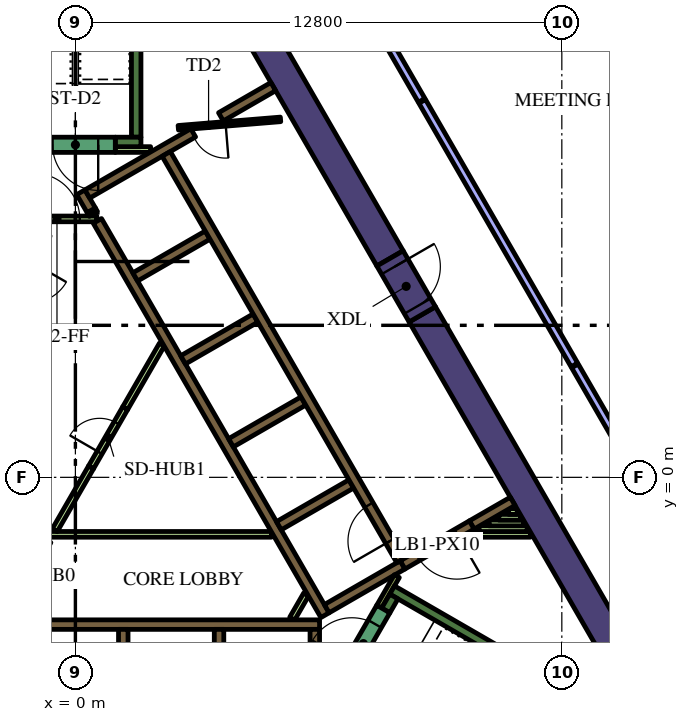
"""IFC4 building model, lengths in metres.
Left out: names, types, materials, properties, quantities, classifications, styles, units other than length and angle.
Written with IfcOpenShell. Run it as: python <this file> out.ifc"""

import sys

from ifc_helpers import new_model, si_unit, direction, frame, frame_2d, origin, place, context, subcontext, project, spatial, rectangle, extrude, element, fill, save


model = new_model("IFC4")
c1 = context("Model", 3, precision=1e-05, world=origin(), true_north=direction((0.0, 1.0)))
c2 = subcontext(c1, "Body", "Model", "MODEL_VIEW")
j1 = project(units=[si_unit("LENGTHUNIT", "METRE"), si_unit("PLANEANGLEUNIT", "RADIAN")], contexts=[c1])
p1 = place(None, origin())
s1 = spatial("IfcSite", under=j1, at=p1, CompositionType="ELEMENT")
p2 = place(p1, origin())
s2 = spatial("IfcBuilding", under=s1, at=p2, CompositionType="ELEMENT")
p3 = place(p2, frame((0.0, 0.0, 171.0)))
s3 = spatial("IfcBuildingStorey", under=s2, at=p3, CompositionType="ELEMENT", Elevation=171.0)
p4 = place(p3, frame((9.129, 4.289, 0.0), z_axis=(0.0, 0.0, 1.0), x_axis=(0.499995742806, -0.866027861663, 0.0)))
e1 = element("IfcWall", 1, at=p4, inside=s3, PredefinedType="SOLIDWALL", context=c2, shape_type="SweptSolid", body=[
    extrude(rectangle(XDim=12.527, YDim=0.8, at=frame_2d((6.264, 0.0))), origin(), (0.0, 0.0, 1.0), 4.2),
])
p5 = place(p3, frame((8.279, 5.761, 0.0), z_axis=(0.0, 0.0, 1.0), x_axis=(-0.500010359015, 0.866019422922, 0.0)))
e2 = element("IfcWall", 2, at=p5, inside=s3, PredefinedType="SOLIDWALL", context=c2, shape_type="SweptSolid", body=[
    extrude(rectangle(XDim=12.528, YDim=0.8, at=frame_2d((6.264, 0.0))), origin(), (0.0, 0.0, 1.0), 4.2),
])
p6 = place(p3, frame((8.334, -2.964, 0.0), z_axis=(0.0, 0.0, 1.0), x_axis=(0.866016039709, -0.500016218704, 0.0)))
e3 = element("IfcWall", 3, at=p6, inside=s3, PredefinedType="SOLIDWALL", context=c2, shape_type="SweptSolid", body=[
    extrude(rectangle(XDim=7.05, YDim=0.25, at=frame_2d((3.525, 0.0))), origin(), (0.0, 0.0, 1.0), 4.2),
])
p7 = place(p3, frame((8.168, -3.503, 0.0), z_axis=(0.0, 0.0, 1.0), x_axis=(0.49972245349, 0.866185586049, 0.0)))
e4 = element("IfcWall", 4, at=p7, inside=s3, PredefinedType="SOLIDWALL", context=c2, shape_type="SweptSolid", body=[
    extrude(rectangle(XDim=0.425, YDim=0.25, at=frame_2d((0.212, 0.0))), origin(), (0.0, 0.0, 1.0), 4.2),
])
p8 = place(p3, frame((1.6, 8.95, 0.0), z_axis=(0.0, 0.0, 1.0), x_axis=(0.0, 1.0, 0.0)))
e5 = element("IfcWall", 5, at=p8, inside=s3, PredefinedType="SOLIDWALL", context=c2, shape_type="SweptSolid", body=[
    extrude(rectangle(XDim=6.8, YDim=0.25, at=frame_2d((3.4, 0.0))), origin(), (0.0, 0.0, 1.0), 4.2),
])
p9 = place(p3, frame((1.05, 8.825, 0.0), z_axis=(0.0, 0.0, 1.0), x_axis=(1.0, 0.0, 0.0)))
e6 = element("IfcWall", 6, at=p9, inside=s3, PredefinedType="SOLIDWALL", context=c2, shape_type="SweptSolid", body=[
    extrude(rectangle(XDim=0.675, YDim=0.25, at=frame_2d((0.337, 0.0))), origin(), (0.0, 0.0, 1.0), 4.2),
])
p10 = place(p3, frame((-5.545, -3.875, 0.0), z_axis=(0.0, 0.0, 1.0), x_axis=(1.0, 0.0, 0.0)))
e7 = element("IfcWall", 7, at=p10, inside=s3, PredefinedType="SOLIDWALL", context=c2, shape_type="SweptSolid", body=[
    extrude(rectangle(XDim=11.97, YDim=0.25, at=frame_2d((5.985, 0.0))), origin(), (0.0, 0.0, 1.0), 4.2),
])
p11 = place(p3, frame((6.3, -7.24, 0.0), z_axis=(0.0, 0.0, 1.0), x_axis=(0.0, 1.0, 0.0)))
e8 = element("IfcWall", 8, at=p11, inside=s3, PredefinedType="SOLIDWALL", context=c2, shape_type="SweptSolid", body=[
    extrude(rectangle(XDim=3.24, YDim=0.25, at=frame_2d((1.62, 0.0))), origin(), (0.0, 0.0, 1.0), 4.2),
])
for number, where, z_axis, x_axis in (
    (9, (3.78, -4.0, 0.0), (0.0, 0.0, 1.0), (0.0, -1.0, 0.0)),
    (10, (1.26, -4.0, 0.0), (0.0, 0.0, 1.0), (0.0, -1.0, 0.0)),
):
    element("IfcWall", number, at=place(p3, frame(where, z_axis=z_axis, x_axis=x_axis)), inside=s3, PredefinedType="SOLIDWALL", context=c2, shape_type="SweptSolid", body=[
        extrude(rectangle(XDim=2.2, YDim=0.25, at=frame_2d((1.1, 0.0))), origin(), (0.0, 0.0, 1.0), 4.2),
    ])
p12 = place(p3, frame((11.507, -0.631, 0.0), z_axis=(0.0, 0.0, 1.0), x_axis=(-0.866025525965, -0.499999788377, 0.0)))
e11 = element("IfcWall", 11, at=p12, inside=s3, PredefinedType="SOLIDWALL", context=c2, shape_type="SweptSolid", body=[
    extrude(rectangle(XDim=1.245, YDim=0.25, at=frame_2d((0.622, 0.0))), origin(), (0.0, 0.0, 1.0), 4.2),
])
p13 = place(p3, frame((0.473, 6.93, 0.0), z_axis=(0.0, 0.0, 1.0), x_axis=(-0.49972245349, 0.866185586049, 0.0)))
e12 = element("IfcWall", 12, at=p13, inside=s3, PredefinedType="SOLIDWALL", context=c2, shape_type="SweptSolid", body=[
    extrude(rectangle(XDim=0.11, YDim=0.25, at=frame_2d((0.055, 0.0))), origin(), (0.0, 0.0, 1.0), 4.2),
])
p14 = place(p3, frame((6.568, -3.627, 0.0), z_axis=(0.0, 0.0, 1.0), x_axis=(-0.499999455981, 0.866025717874, 0.0)))
e13 = element("IfcWall", 13, at=p14, inside=s3, PredefinedType="SOLIDWALL", context=c2, shape_type="SweptSolid", body=[
    extrude(rectangle(XDim=11.978, YDim=0.25, at=frame_2d((5.989, 0.0))), origin(), (0.0, 0.0, 1.0), 4.2),
])
p15 = place(p3, frame((0.417, 7.027, 0.0), z_axis=(0.0, 0.0, 1.0), x_axis=(-0.500210807569, 0.865903659763, 0.0)))
e14 = element("IfcWall", 14, at=p15, inside=s3, PredefinedType="SOLIDWALL", context=c2, shape_type="SweptSolid", body=[
    extrude(rectangle(XDim=0.548, YDim=0.25, at=frame_2d((0.274, 0.0))), origin(), (0.0, 0.0, 1.0), 4.2),
])
p16 = place(p3, frame((3.1, 9.064, 0.0), z_axis=(0.0, 0.0, 1.0), x_axis=(-0.866030133475, -0.499991807846, 0.0)))
e15 = element("IfcWall", 15, at=p16, inside=s3, PredefinedType="SOLIDWALL", context=c2, shape_type="SweptSolid", body=[
    extrude(rectangle(XDim=3.217, YDim=0.25, at=frame_2d((1.608, 0.0))), origin(), (0.0, 0.0, 1.0), 4.2),
])
p17 = place(p3, frame((1.574, 5.274, 0.0), z_axis=(0.0, 0.0, 1.0), x_axis=(0.866028486751, 0.499994660107, 0.0)))
e16 = element("IfcWall", 16, at=p17, inside=s3, PredefinedType="SOLIDWALL", context=c2, shape_type="SweptSolid", body=[
    extrude(rectangle(XDim=2.2, YDim=0.25, at=frame_2d((1.1, 0.0))), origin(), (0.0, 0.0, 1.0), 4.2),
])
for number, where, z_axis, x_axis in (
    (17, (2.834, 3.091, 0.0), (0.0, 0.0, 1.0), (0.866, 0.5, 0.0)),
    (18, (4.094, 0.909, 0.0), (0.0, 0.0, 1.0), (0.866, 0.5, 0.0)),
    (19, (5.354, -1.274, 0.0), (0.0, 0.0, 1.0), (0.866, 0.5, 0.0)),
):
    element("IfcWall", number, at=place(p3, frame(where, z_axis=z_axis, x_axis=x_axis)), inside=s3, PredefinedType="SOLIDWALL", context=c2, shape_type="SweptSolid", body=[
        extrude(rectangle(XDim=2.2, YDim=0.25, at=frame_2d((1.1, 0.0))), origin(), (0.0, 0.0, 1.0), 4.2),
    ])
p18 = place(p3, frame((6.614, -3.456, 0.0), z_axis=(0.0, 0.0, 1.0), x_axis=(0.866025089694, 0.500000544019, 0.0)))
e20 = element("IfcWall", 20, at=p18, inside=s3, PredefinedType="SOLIDWALL", context=c2, shape_type="SweptSolid", body=[
    extrude(rectangle(XDim=2.305, YDim=0.25, at=frame_2d((1.153, 0.0))), origin(), (0.0, 0.0, 1.0), 4.2),
])
p19 = place(p3, frame((3.83, 9.486, 0.0), z_axis=(0.0, 0.0, 1.0), x_axis=(0.865986202621, 0.500067892261, 0.0)))
e21 = element("IfcWall", 21, at=p19, inside=s3, PredefinedType="SOLIDWALL", context=c2, shape_type="SweptSolid", body=[
    extrude(rectangle(XDim=1.591, YDim=0.25, at=frame_2d((0.795, 0.0))), origin(), (0.0, 0.0, 1.0), 4.2),
])
p20 = place(p3, frame((1.05, 8.625, 0.0), z_axis=(0.0, 0.0, 1.0), x_axis=(1.0, 0.0, 0.0)))
e22 = element("IfcWall", 22, at=p20, inside=s3, PredefinedType="PARTITIONING", context=c2, shape_type="SweptSolid", body=[
    extrude(rectangle(XDim=0.929, YDim=0.15, at=frame_2d((0.464, 0.0))), origin(), (0.0, 0.0, 1.0), 3.15),
])
p21 = place(p3, frame((10.362, -1.5, 0.0), z_axis=(0.0, 0.0, 1.0), x_axis=(1.0, 0.0, 0.0)))
e23 = element("IfcWall", 23, at=p21, inside=s3, PredefinedType="PARTITIONING", context=c2, shape_type="SweptSolid", body=[
    extrude(rectangle(XDim=1.61, YDim=0.15, at=frame_2d((0.805, 0.0))), origin(), (0.0, 0.0, 1.0), 3.15),
])
p22 = place(p3, frame((10.622, -1.35, 0.0), z_axis=(0.0, 0.0, 1.0), x_axis=(1.0, 0.0, 0.0)))
e24 = element("IfcWall", 24, at=p22, inside=s3, PredefinedType="PARTITIONING", context=c2, shape_type="SweptSolid", body=[
    extrude(rectangle(XDim=1.263, YDim=0.15, at=frame_2d((0.632, 0.0))), origin(), (0.0, 0.0, 1.0), 3.15),
])
p23 = place(p3, frame((10.882, -1.2, 0.0), z_axis=(0.0, 0.0, 1.0), x_axis=(1.0, 0.0, 0.0)))
e25 = element("IfcWall", 25, at=p23, inside=s3, PredefinedType="PARTITIONING", context=c2, shape_type="SweptSolid", body=[
    extrude(rectangle(XDim=0.917, YDim=0.15, at=frame_2d((0.459, 0.0))), origin(), (0.0, 0.0, 1.0), 3.15),
])
p24 = place(p3, frame((11.712, -1.05, 0.0), z_axis=(0.0, 0.0, 1.0), x_axis=(-1.0, 0.0, 0.0)))
e26 = element("IfcWall", 26, at=p24, inside=s3, PredefinedType="PARTITIONING", context=c2, shape_type="SweptSolid", body=[
    extrude(rectangle(XDim=0.571, YDim=0.15, at=frame_2d((0.285, 0.0))), origin(), (0.0, 0.0, 1.0), 3.15),
])
p25 = place(p3, frame((11.401, -0.9, 0.0), z_axis=(0.0, 0.0, 1.0), x_axis=(1.0, 0.0, 0.0)))
e27 = element("IfcWall", 27, at=p25, inside=s3, PredefinedType="PARTITIONING", context=c2, shape_type="SweptSolid", body=[
    extrude(rectangle(XDim=0.224, YDim=0.15, at=frame_2d((0.112, 0.0))), origin(), (0.0, 0.0, 1.0), 3.15),
])
p26 = place(p3, frame((8.459, -2.599, 0.0), z_axis=(0.0, 0.0, 1.0), x_axis=(-0.500041054325, -0.866001699761, 0.0)))
e28 = element("IfcWall", 28, at=p26, inside=s3, PredefinedType="PARTITIONING", context=c2, shape_type="SweptSolid", body=[
    extrude(rectangle(XDim=0.929, YDim=0.15, at=frame_2d((0.464, 0.0))), origin(), (0.0, 0.0, 1.0), 4.2),
])
p27 = place(p3, frame((5.705, -3.718, 0.0), z_axis=(0.0, 0.0, 1.0), x_axis=(0.499962090823, 0.866047289552, 0.0)))
e29 = element("IfcWall", 29, at=p27, inside=s3, PredefinedType="PARTITIONING", context=c2, shape_type="SweptSolid", body=[
    extrude(rectangle(XDim=0.735, YDim=0.15, at=frame_2d((0.367, 0.0))), origin(), (0.0, 0.0, 1.0), 3.15),
])
p28 = place(p3, frame((-4.2, -1.5, 0.0), z_axis=(0.0, 0.0, 1.0), x_axis=(1.0, 0.0, 0.0)))
e30 = element("IfcWall", 30, at=p28, inside=s3, PredefinedType="PARTITIONING", context=c2, shape_type="SweptSolid", body=[
    extrude(rectangle(XDim=9.359, YDim=0.15, at=frame_2d((4.68, 0.0))), origin(), (0.0, 0.0, 1.0), 3.15),
])
p29 = place(p3, frame((-0.544, -1.393, 0.0), z_axis=(0.0, 0.0, 1.0), x_axis=(0.499928740635, 0.866066541489, 0.0)))
e31 = element("IfcWall", 31, at=p29, inside=s3, PredefinedType="PARTITIONING", context=c2, shape_type="SweptSolid", body=[
    extrude(rectangle(XDim=1.912, YDim=0.15, at=frame_2d((0.956, 0.0))), origin(), (0.0, 0.0, 1.0), 3.15),
])
p30 = place(p3, frame((1.312, 1.822, 0.0), z_axis=(0.0, 0.0, 1.0), x_axis=(0.500003549559, 0.866023354436, 0.0)))
e32 = element("IfcWall", 32, at=p30, inside=s3, PredefinedType="PARTITIONING", context=c2, shape_type="SweptSolid", body=[
    extrude(rectangle(XDim=1.93, YDim=0.15, at=frame_2d((0.965, 0.0))), origin(), (0.0, 0.0, 1.0), 3.15),
])
p31 = place(p3, frame((8.565, -2.185, 0.0), z_axis=(0.0, 0.0, 1.0), x_axis=(-0.499997954832, 0.866026584559, 0.0)))
e33 = element("IfcWall", 33, at=p31, inside=s3, PredefinedType="SOLIDWALL", context=c2, shape_type="SweptSolid", body=[
    extrude(rectangle(XDim=12.35, YDim=0.25, at=frame_2d((6.175, 0.0))), origin(), (0.0, 0.0, 1.0), 4.2),
])
p32 = place(p31, frame((0.585, 0.0, 0.0)))
e34 = element("IfcOpeningElement", 34, at=p32, cuts=e33, PredefinedType="OPENING", context=c2, shape_type="SweptSolid", body=[
    extrude(rectangle(XDim=1.1, YDim=2.1, at=frame_2d((0.55, 1.05))), frame((0.0, 0.135, 0.0), z_axis=(0.0, -1.0, 0.0), x_axis=(1.0, 0.0, 0.0)), (0.0, 0.0, 1.0), 0.27),
])
p33 = place(p3, frame((7.053, -5.284, 0.0), z_axis=(0.0, 0.0, 1.0), x_axis=(0.500078061341, 0.865980330357, 0.0)))
e35 = element("IfcWall", 35, at=p33, inside=s3, PredefinedType="SOLIDWALL", context=c2, shape_type="SweptSolid", body=[
    extrude(rectangle(XDim=2.1, YDim=0.4, at=frame_2d((1.05, 0.0))), origin(), (0.0, 0.0, 1.0), 4.2),
])
p34 = place(p33, frame((0.45, 0.0, 0.0)))
e36 = element("IfcOpeningElement", 36, at=p34, cuts=e35, PredefinedType="OPENING", context=c2, shape_type="SweptSolid", body=[
    extrude(rectangle(XDim=1.2, YDim=2.1, at=frame_2d((0.6, 1.05))), frame((0.0, 0.21, 0.0), z_axis=(0.0, -1.0, 0.0), x_axis=(1.0, 0.0, 0.0)), (0.0, 0.0, 1.0), 0.42),
])
p35 = place(p3, frame((1.05, 8.75, 0.0), z_axis=(0.0, 0.0, 1.0), x_axis=(-1.0, 0.0, 0.0)))
e37 = element("IfcWall", 37, at=p35, inside=s3, PredefinedType="SOLIDWALL", context=c2, shape_type="SweptSolid", body=[
    extrude(rectangle(XDim=2.1, YDim=0.4, at=frame_2d((1.05, 0.0))), origin(), (0.0, 0.0, 1.0), 4.2),
])
p36 = place(p35, frame((0.45, 0.0, 0.0)))
e38 = element("IfcOpeningElement", 38, at=p36, cuts=e37, PredefinedType="OPENING", context=c2, shape_type="SweptSolid", body=[
    extrude(rectangle(XDim=1.2, YDim=2.1, at=frame_2d((0.6, 1.05))), frame((0.0, 0.21, 0.0), z_axis=(0.0, -1.0, 0.0), x_axis=(1.0, 0.0, 0.0)), (0.0, 0.0, 1.0), 0.42),
])
p37 = place(p3, frame((5.398, 9.419, 0.0), z_axis=(0.0, 0.0, 1.0), x_axis=(-0.996653416376, -0.081743303248, 0.0)))
e39 = element("IfcWall", 39, at=p37, inside=s3, PredefinedType="PARTITIONING", context=c2, shape_type="SweptSolid", body=[
    extrude(rectangle(XDim=2.7, YDim=0.12, at=frame_2d((1.35, 0.0))), origin(), (0.0, 0.0, 1.0), 3.15),
])
p38 = place(p37, frame((1.45, 0.0, 0.0)))
e40 = element("IfcOpeningElement", 40, at=p38, cuts=e39, PredefinedType="OPENING", context=c2, shape_type="SweptSolid", body=[
    extrude(rectangle(XDim=0.9, YDim=2.1, at=frame_2d((0.45, 1.05))), frame((0.0, 0.07, 0.0), z_axis=(0.0, -1.0, 0.0), x_axis=(1.0, 0.0, 0.0)), (0.0, 0.0, 1.0), 0.14),
])
p39 = place(p3, frame((-1.534, 6.8, 0.0), z_axis=(0.0, 0.0, 1.0), x_axis=(1.0, 0.0, 0.0)))
e41 = element("IfcWall", 41, at=p39, inside=s3, PredefinedType="PARTITIONING", context=c2, shape_type="SweptSolid", body=[
    extrude(rectangle(XDim=2.1, YDim=0.15, at=frame_2d((1.05, 0.0))), origin(), (0.0, 0.0, 1.0), 3.15),
])
p40 = place(p39, frame((0.45, 0.0, 0.0)))
e42 = element("IfcOpeningElement", 42, at=p40, cuts=e41, PredefinedType="OPENING", context=c2, shape_type="SweptSolid", body=[
    extrude(rectangle(XDim=1.2, YDim=2.1, at=frame_2d((0.6, 1.05))), frame((0.0, 0.085, 0.0), z_axis=(0.0, -1.0, 0.0), x_axis=(1.0, 0.0, 0.0)), (0.0, 0.0, 1.0), 0.17),
])
p41 = place(p3, frame((10.429, -1.253, 0.0), z_axis=(0.0, 0.0, 1.0), x_axis=(-0.866009402589, -0.500027713859, 0.0)))
e43 = element("IfcWall", 43, at=p41, inside=s3, PredefinedType="SOLIDWALL", context=c2, shape_type="SweptSolid", body=[
    extrude(rectangle(XDim=2.1, YDim=0.25, at=frame_2d((1.05, 0.0))), origin(), (0.0, 0.0, 1.0), 4.2),
])
p42 = place(p41, frame((0.45, 0.0, 0.0)))
e44 = element("IfcOpeningElement", 44, at=p42, cuts=e43, PredefinedType="OPENING", context=c2, shape_type="SweptSolid", body=[
    extrude(rectangle(XDim=1.2, YDim=2.1, at=frame_2d((0.6, 1.05))), frame((0.0, 0.135, 0.0), z_axis=(0.0, -1.0, 0.0), x_axis=(1.0, 0.0, 0.0)), (0.0, 0.0, 1.0), 0.27),
])
p43 = place(p3, frame((8.279, 5.761, 0.0), z_axis=(0.0, 0.0, 1.0), x_axis=(0.500062241894, -0.865989465428, 0.0)))
e45 = element("IfcWall", 45, at=p43, inside=s3, PredefinedType="SOLIDWALL", context=c2, shape_type="SweptSolid", body=[
    extrude(rectangle(XDim=1.7, YDim=0.8, at=frame_2d((0.85, 0.0))), origin(), (0.0, 0.0, 1.0), 4.2),
])
p44 = place(p43, frame((0.25, 0.0, 0.0)))
e46 = element("IfcOpeningElement", 46, at=p44, cuts=e45, PredefinedType="OPENING", context=c2, shape_type="SweptSolid", body=[
    extrude(rectangle(XDim=1.2, YDim=2.1, at=frame_2d((0.6, 1.05))), frame((0.0, 0.41, 0.0), z_axis=(0.0, -1.0, 0.0), x_axis=(1.0, 0.0, 0.0)), (0.0, 0.0, 1.0), 0.82),
])
p45 = place(p3, frame((0.412, 0.263, 0.0), z_axis=(0.0, 0.0, 1.0), x_axis=(0.500062916607, 0.865989075817, 0.0)))
e47 = element("IfcWall", 47, at=p45, inside=s3, PredefinedType="PARTITIONING", context=c2, shape_type="SweptSolid", body=[
    extrude(rectangle(XDim=1.8, YDim=0.15, at=frame_2d((0.9, 0.0))), origin(), (0.0, 0.0, 1.0), 3.15),
])
p46 = place(p45, frame((0.45, 0.0, 0.0)))
e48 = element("IfcOpeningElement", 48, at=p46, cuts=e47, PredefinedType="OPENING", context=c2, shape_type="SweptSolid", body=[
    extrude(rectangle(XDim=0.9, YDim=2.1, at=frame_2d((0.45, 1.05))), frame((0.0, 0.085, 0.0), z_axis=(0.0, -1.0, 0.0), x_axis=(1.0, 0.0, 0.0)), (0.0, 0.0, 1.0), 0.17),
])
p47 = place(p3, frame((13.13, 2.958, 0.0), z_axis=(0.0, 0.0, 1.0), x_axis=(-0.499995158272, 0.866028199139, 0.0)))
e49 = element("IfcWall", 49, at=p47, inside=s3, PredefinedType="PARTITIONING", context=c2, shape_type="SweptSolid", body=[
    extrude(rectangle(XDim=8.008, YDim=0.2, at=frame_2d((4.004, 0.0))), origin(), (0.0, 0.0, 1.0), 3.15),
])
p48 = place(p3, frame((9.111, 9.918, 0.0), z_axis=(0.0, 0.0, 1.0), x_axis=(-0.499954382462, 0.86605173948, 0.0)))
e50 = element("IfcWall", 50, at=p48, inside=s3, PredefinedType="PARTITIONING", context=c2, shape_type="SweptSolid", body=[
    extrude(rectangle(XDim=2.278, YDim=0.2, at=frame_2d((1.139, 0.0))), origin(), (0.0, 0.0, 1.0), 3.15),
])
p49 = place(p3, frame((14.297, 0.937, 0.0), z_axis=(0.0, 0.0, 1.0), x_axis=(-0.499970234539, 0.866042588199, 0.0)))
e51 = element("IfcWall", 51, at=p49, inside=s3, PredefinedType="PARTITIONING", context=c2, shape_type="SweptSolid", body=[
    extrude(rectangle(XDim=2.303, YDim=0.2, at=frame_2d((1.151, 0.0))), origin(), (0.0, 0.0, 1.0), 3.15),
])
p50 = place(p32, origin())
e52 = element("IfcDoor", 52, at=p50, inside=s3, OperationType="DOUBLE_DOOR_SLIDING", PredefinedType="DOOR", context=c2, shape_type="SweptSolid", body=[
    extrude(rectangle(XDim=1.1, YDim=2.1, at=frame_2d((0.55, 1.05))), frame((0.0, 0.025, 0.0), z_axis=(0.0, -1.0, 0.0), x_axis=(1.0, 0.0, 0.0)), (0.0, 0.0, 1.0), 0.05),
])
fill(e34, e52)
p51 = place(p34, origin())
e53 = element("IfcDoor", 53, at=p51, inside=s3, OperationType="SINGLE_SWING_LEFT", PredefinedType="DOOR", context=c2, shape_type="SweptSolid", body=[
    extrude(rectangle(XDim=1.2, YDim=2.1, at=frame_2d((0.6, 1.05))), frame((0.0, 0.025, 0.0), z_axis=(0.0, -1.0, 0.0), x_axis=(1.0, 0.0, 0.0)), (0.0, 0.0, 1.0), 0.05),
])
fill(e36, e53)
p52 = place(p36, origin())
e54 = element("IfcDoor", 54, at=p52, inside=s3, OperationType="SINGLE_SWING_LEFT", PredefinedType="DOOR", context=c2, shape_type="SweptSolid", body=[
    extrude(rectangle(XDim=1.2, YDim=2.1, at=frame_2d((0.6, 1.05))), frame((0.0, 0.025, 0.0), z_axis=(0.0, -1.0, 0.0), x_axis=(1.0, 0.0, 0.0)), (0.0, 0.0, 1.0), 0.05),
])
fill(e38, e54)
p53 = place(p38, origin())
e55 = element("IfcDoor", 55, at=p53, inside=s3, OperationType="SINGLE_SWING_LEFT", PredefinedType="DOOR", context=c2, shape_type="SweptSolid", body=[
    extrude(rectangle(XDim=0.9, YDim=2.1, at=frame_2d((0.45, 1.05))), frame((0.0, 0.025, 0.0), z_axis=(0.0, -1.0, 0.0), x_axis=(1.0, 0.0, 0.0)), (0.0, 0.0, 1.0), 0.05),
])
fill(e40, e55)
p54 = place(p40, origin())
e56 = element("IfcDoor", 56, at=p54, inside=s3, OperationType="SINGLE_SWING_LEFT", PredefinedType="DOOR", context=c2, shape_type="SweptSolid", body=[
    extrude(rectangle(XDim=1.2, YDim=2.1, at=frame_2d((0.6, 1.05))), frame((0.0, 0.025, 0.0), z_axis=(0.0, -1.0, 0.0), x_axis=(1.0, 0.0, 0.0)), (0.0, 0.0, 1.0), 0.05),
])
fill(e42, e56)
p55 = place(p42, origin())
e57 = element("IfcDoor", 57, at=p55, inside=s3, OperationType="SINGLE_SWING_LEFT", PredefinedType="DOOR", context=c2, shape_type="SweptSolid", body=[
    extrude(rectangle(XDim=1.2, YDim=2.1, at=frame_2d((0.6, 1.05))), frame((0.0, 0.025, 0.0), z_axis=(0.0, -1.0, 0.0), x_axis=(1.0, 0.0, 0.0)), (0.0, 0.0, 1.0), 0.05),
])
fill(e44, e57)
p56 = place(p44, origin())
e58 = element("IfcDoor", 58, at=p56, inside=s3, OperationType="SINGLE_SWING_LEFT", PredefinedType="DOOR", context=c2, shape_type="SweptSolid", body=[
    extrude(rectangle(XDim=1.2, YDim=2.1, at=frame_2d((0.6, 1.05))), frame((0.0, 0.025, 0.0), z_axis=(0.0, -1.0, 0.0), x_axis=(1.0, 0.0, 0.0)), (0.0, 0.0, 1.0), 0.05),
])
fill(e46, e58)
p57 = place(p46, origin())
e59 = element("IfcDoor", 59, at=p57, inside=s3, OperationType="SINGLE_SWING_LEFT", PredefinedType="DOOR", context=c2, shape_type="SweptSolid", body=[
    extrude(rectangle(XDim=0.9, YDim=2.1, at=frame_2d((0.45, 1.05))), frame((0.0, 0.025, 0.0), z_axis=(0.0, -1.0, 0.0), x_axis=(1.0, 0.0, 0.0)), (0.0, 0.0, 1.0), 0.05),
])
fill(e48, e59)
save(model, sys.argv[1])
